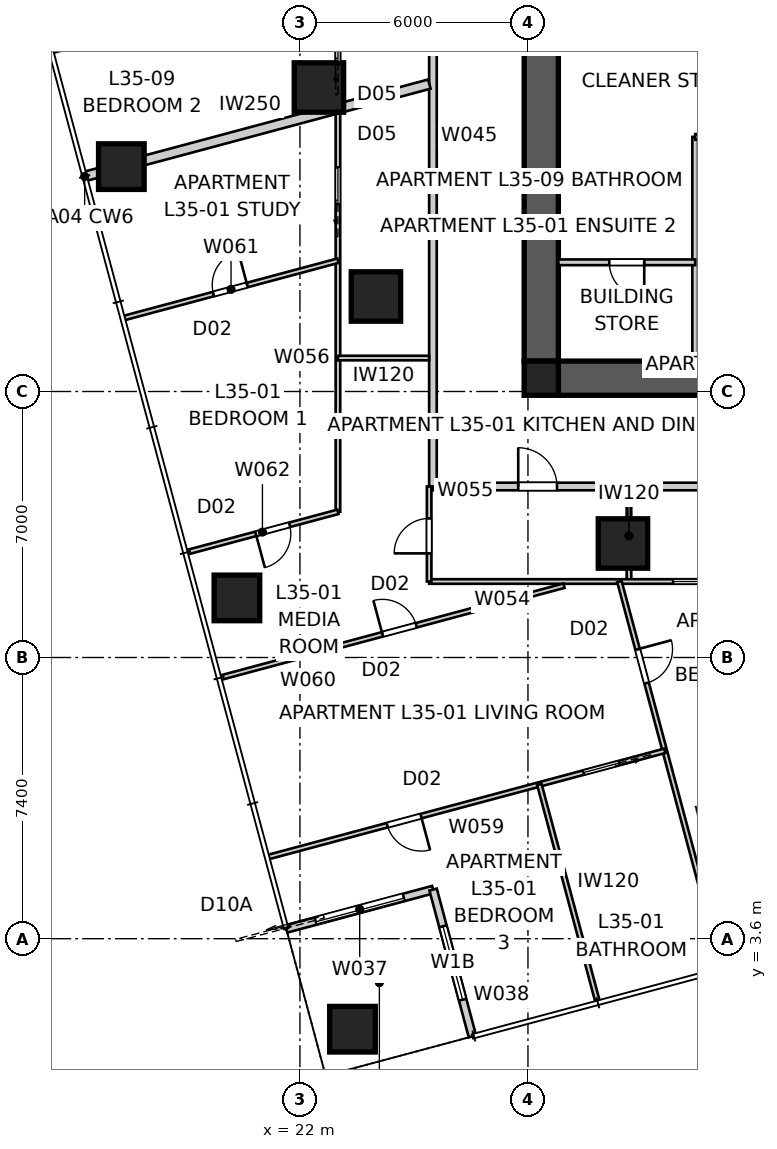
"""IFC4 building model, lengths in metres.
Left out: names, types, materials, properties, quantities, classifications, styles, units other than length and angle.
Written with IfcOpenShell. Run it as: python <this file> out.ifc"""

import sys

from ifc_helpers import new_model, si_unit, direction, frame, frame_2d, origin, origin_2d, place, context, subcontext, project, spatial, polyline, rectangle, outline, extrude, element, fill, save


model = new_model("IFC4")
c1 = context("Model", 3, precision=1e-05, world=origin(), true_north=direction((0.0, 1.0)))
c2 = subcontext(c1, "Body", "Model", "MODEL_VIEW")
j1 = project(units=[si_unit("LENGTHUNIT", "METRE"), si_unit("PLANEANGLEUNIT", "RADIAN")], contexts=[c1])
p1 = place(None, origin())
s1 = spatial("IfcSite", under=j1, at=p1, CompositionType="ELEMENT")
p2 = place(p1, origin())
s2 = spatial("IfcBuilding", under=s1, at=p2, CompositionType="ELEMENT")
p3 = place(p2, frame((0.0, 0.0, 128.6)))
s3 = spatial("IfcBuildingStorey", under=s2, at=p3, CompositionType="ELEMENT", Elevation=128.6)
p4 = place(p3, frame((51.2, 18.35, 0.0), z_axis=(0.0, 0.0, 1.0), x_axis=(-1.0, 0.0, 0.0)))
e1 = element("IfcWall", 1, at=p4, inside=s3, PredefinedType="SHEAR", context=c2, shape_type="SweptSolid", body=[
    extrude(outline(polyline([(0.0, -0.45), (22.4, -0.45), (22.4, -0.025), (22.85, -0.025), (22.85, 0.025), (22.4, 0.025), (22.4, 0.45), (0.0, 0.45), (0.0, 0.025), (-0.45, 0.025), (-0.45, -0.025), (0.0, -0.025), (0.0, -0.45)])), origin(), (0.0, 0.0, 1.0), 3.4),
])
p5 = place(p3, frame((28.35, 41.2, 0.0), z_axis=(0.0, 0.0, 1.0), x_axis=(0.0, -1.0, 0.0)))
e2 = element("IfcWall", 2, at=p5, inside=s3, PredefinedType="SHEAR", context=c2, shape_type="SweptSolid", body=[
    extrude(outline(polyline([(0.0, -0.45), (22.4, -0.45), (22.4, -0.025), (22.85, -0.025), (22.85, 0.025), (22.4, 0.025), (22.4, 0.45), (0.0, 0.45), (0.0, 0.025), (-0.45, 0.025), (-0.45, -0.025), (0.0, -0.025), (0.0, -0.45)])), origin(), (0.0, 0.0, 1.0), 3.4),
])
p6 = place(p5, frame((11.14, 0.0, 0.0)))
e3 = element("IfcOpeningElement", 3, at=p6, cuts=e2, PredefinedType="OPENING", context=c2, shape_type="SweptSolid", body=[
    extrude(rectangle(XDim=1.02, YDim=2.4, at=frame_2d((0.51, 1.2))), frame((0.0, 0.46, 0.0), z_axis=(0.0, -1.0, 0.0), x_axis=(1.0, 0.0, 0.0)), (0.0, 0.0, 1.0), 0.92),
])
p7 = place(p3, frame((28.35, 18.35, 0.0), z_axis=(0.0, 0.0, 1.0), x_axis=(1.0, 0.0, 0.0)))
e4 = element("IfcColumn", 4, at=p7, inside=s3, PredefinedType="COLUMN", context=c2, shape_type="SweptSolid", body=[
    extrude(rectangle(XDim=0.9, YDim=0.9, at=origin_2d()), origin(), (0.0, 0.0, 1.0), 3.4),
])
for number, where, z_axis, x_axis in (
    (5, (23.383, 1.219, 0.0), (0.0, 0.0, 1.0), (1.0, 0.0, 0.0)),
    (6, (17.301, 23.918, 0.0), (0.0, 0.0, 1.0), (1.0, 0.0, 0.0)),
    (7, (20.342, 12.568, 0.0), (0.0, 0.0, 1.0), (1.0, 0.0, 0.0)),
):
    element("IfcColumn", number, at=place(p3, frame(where, z_axis=z_axis, x_axis=x_axis)), inside=s3, PredefinedType="COLUMN", context=c2, shape_type="SweptSolid", body=[
        extrude(rectangle(XDim=1.2, YDim=1.2, at=origin_2d()), origin(), (0.0, 0.0, 1.0), 3.4),
    ])
for number, where, z_axis, x_axis in (
    (8, (22.5, 26.0, 0.0), (0.0, 0.0, 1.0), (1.0, 0.0, 0.0)),
    (9, (24.0, 20.5, 0.0), (0.0, 0.0, 1.0), (1.0, 0.0, 0.0)),
    (10, (30.5, 14.0, 0.0), (0.0, 0.0, 1.0), (1.0, 0.0, 0.0)),
):
    element("IfcColumn", number, at=place(p3, frame(where, z_axis=z_axis, x_axis=x_axis)), inside=s3, PredefinedType="COLUMN", context=c2, shape_type="SweptSolid", body=[
        extrude(rectangle(XDim=1.3, YDim=1.3, at=origin_2d()), origin(), (0.0, 0.0, 1.0), 3.4),
    ])
p8 = place(p3, frame((21.641, 3.857, 0.0), z_axis=(0.0, 0.0, 1.0), x_axis=(0.965919172068, 0.258843877716, 0.0)))
e11 = element("IfcWall", 11, at=p8, inside=s3, PredefinedType="SOLIDWALL", context=c2, shape_type="SweptSolid", body=[
    extrude(rectangle(XDim=4.0, YDim=0.2, at=frame_2d((2.0, 0.0))), origin(), (0.0, 0.0, 1.0), 3.25),
])
p9 = place(p8, frame((0.8, 0.0, 0.0)))
e12 = element("IfcOpeningElement", 12, at=p9, cuts=e11, PredefinedType="OPENING", context=c2, shape_type="SweptSolid", body=[
    extrude(rectangle(XDim=2.4, YDim=2.1, at=frame_2d((1.2, 1.05))), frame((0.0, 0.11, 0.0), z_axis=(0.0, -1.0, 0.0), x_axis=(1.0, 0.0, 0.0)), (0.0, 0.0, 1.0), 0.22),
])
p10 = place(p3, frame((25.504, 4.893, 0.0), z_axis=(0.0, 0.0, 1.0), x_axis=(0.258786931944, -0.965934430412, 0.0)))
e13 = element("IfcWall", 13, at=p10, inside=s3, PredefinedType="SOLIDWALL", context=c2, shape_type="SweptSolid", body=[
    extrude(rectangle(XDim=4.0, YDim=0.2, at=frame_2d((2.0, 0.0))), origin(), (0.0, 0.0, 1.0), 3.25),
])
p11 = place(p10, frame((1.0, 0.0, 0.45)))
e14 = element("IfcOpeningElement", 14, at=p11, cuts=e13, PredefinedType="OPENING", context=c2, shape_type="SweptSolid", body=[
    extrude(rectangle(XDim=2.0, YDim=1.8, at=frame_2d((1.0, 0.9))), frame((0.0, 0.11, 0.0), z_axis=(0.0, -1.0, 0.0), x_axis=(1.0, 0.0, 0.0)), (0.0, 0.0, 1.0), 0.22),
])
p12 = place(p3, frame((25.5, 15.5, 0.0), z_axis=(0.0, 0.0, 1.0), x_axis=(1.0, 0.0, 0.0)))
e15 = element("IfcWall", 15, at=p12, inside=s3, PredefinedType="PARTITIONING", context=c2, shape_type="SweptSolid", body=[
    extrude(rectangle(XDim=28.2, YDim=0.2, at=frame_2d((14.1, 0.0))), origin(), (0.0, 0.0, 1.0), 3.25),
])
p13 = place(p12, frame((2.244, 0.0, 0.0)))
e16 = element("IfcOpeningElement", 16, at=p13, cuts=e15, PredefinedType="OPENING", context=c2, shape_type="SweptSolid", body=[
    extrude(rectangle(XDim=1.02, YDim=2.1, at=frame_2d((0.51, 1.05))), frame((0.0, 0.11, 0.0), z_axis=(0.0, -1.0, 0.0), x_axis=(1.0, 0.0, 0.0)), (0.0, 0.0, 1.0), 0.22),
])
p14 = place(p12, frame((9.542, 0.0, 0.0)))
e17 = element("IfcOpeningElement", 17, at=p14, cuts=e15, PredefinedType="OPENING", context=c2, shape_type="SweptSolid", body=[
    extrude(rectangle(XDim=1.02, YDim=2.34, at=frame_2d((0.51, 1.17))), frame((0.0, 0.11, 0.0), z_axis=(0.0, -1.0, 0.0), x_axis=(1.0, 0.0, 0.0)), (0.0, 0.0, 1.0), 0.22),
])
p15 = place(p12, frame((21.994, 0.0, 0.0)))
e18 = element("IfcOpeningElement", 18, at=p15, cuts=e15, PredefinedType="OPENING", context=c2, shape_type="SweptSolid", body=[
    extrude(rectangle(XDim=1.02, YDim=2.34, at=frame_2d((0.51, 1.17))), frame((0.0, 0.11, 0.0), z_axis=(0.0, -1.0, 0.0), x_axis=(1.0, 0.0, 0.0)), (0.0, 0.0, 1.0), 0.22),
])
p16 = place(p3, frame((25.5, 43.7, 0.0), z_axis=(0.0, 0.0, 1.0), x_axis=(0.0, -1.0, 0.0)))
e19 = element("IfcWall", 19, at=p16, inside=s3, PredefinedType="PARTITIONING", context=c2, shape_type="SweptSolid", body=[
    extrude(rectangle(XDim=28.2, YDim=0.2, at=frame_2d((14.1, 0.0))), origin(), (0.0, 0.0, 1.0), 3.25),
])
p17 = place(p16, frame((8.742, 0.0, 0.0)))
e20 = element("IfcOpeningElement", 20, at=p17, cuts=e19, PredefinedType="OPENING", context=c2, shape_type="SweptSolid", body=[
    extrude(rectangle(XDim=1.02, YDim=2.34, at=frame_2d((0.51, 1.17))), frame((0.0, 0.11, 0.0), z_axis=(0.0, -1.0, 0.0), x_axis=(1.0, 0.0, 0.0)), (0.0, 0.0, 1.0), 0.22),
])
p18 = place(p16, frame((1.808, 0.0, 0.0)))
e21 = element("IfcOpeningElement", 21, at=p18, cuts=e19, PredefinedType="OPENING", context=c2, shape_type="SweptSolid", body=[
    extrude(rectangle(XDim=1.02, YDim=2.1, at=frame_2d((0.51, 1.05))), frame((0.0, 0.11, 0.0), z_axis=(0.0, -1.0, 0.0), x_axis=(1.0, 0.0, 0.0)), (0.0, 0.0, 1.0), 0.22),
])
p19 = place(p3, frame((16.335, 23.659, 0.0), z_axis=(0.0, 0.0, 1.0), x_axis=(0.965927049013, 0.258814481793, 0.0)))
e22 = element("IfcWall", 22, at=p19, inside=s3, PredefinedType="PARTITIONING", context=c2, shape_type="SweptSolid", body=[
    extrude(rectangle(XDim=9.392, YDim=0.25, at=frame_2d((4.696, 0.0))), origin(), (0.0, 0.0, 1.0), 3.25),
])
p20 = place(p3, frame((32.4, 18.8, 0.0), z_axis=(0.0, 0.0, 1.0), x_axis=(0.0, 1.0, 0.0)))
e23 = element("IfcWall", 23, at=p20, inside=s3, PredefinedType="SOLIDWALL", context=c2, shape_type="SweptSolid", body=[
    extrude(rectangle(XDim=5.9, YDim=0.15, at=frame_2d((2.95, 0.0))), origin(), (0.0, 0.0, 1.0), 3.25),
])
p21 = place(p3, frame((32.4, 24.7, 0.0), z_axis=(0.0, 0.0, 1.0), x_axis=(1.0, 0.0, 0.0)))
e24 = element("IfcWall", 24, at=p21, inside=s3, PredefinedType="SOLIDWALL", context=c2, shape_type="SweptSolid", body=[
    extrude(rectangle(XDim=1.85, YDim=0.15, at=frame_2d((0.925, 0.0))), origin(), (0.0, 0.0, 1.0), 3.25),
])
p22 = place(p3, frame((32.4, 21.4, 0.0), z_axis=(0.0, 0.0, 1.0), x_axis=(-1.0, 0.0, 0.0)))
e25 = element("IfcWall", 25, at=p22, inside=s3, PredefinedType="SOLIDWALL", context=c2, shape_type="SweptSolid", body=[
    extrude(rectangle(XDim=3.6, YDim=0.15, at=frame_2d((1.8, 0.0))), origin(), (0.0, 0.0, 1.0), 3.25),
])
p23 = place(p22, frame((1.34, 0.0, 0.0)))
e26 = element("IfcOpeningElement", 26, at=p23, cuts=e25, PredefinedType="OPENING", context=c2, shape_type="SweptSolid", body=[
    extrude(rectangle(XDim=0.92, YDim=2.1, at=frame_2d((0.46, 1.05))), frame((0.0, 0.085, 0.0), z_axis=(0.0, -1.0, 0.0), x_axis=(1.0, 0.0, 0.0)), (0.0, 0.0, 1.0), 0.17),
])
p24 = place(p3, frame((30.658, 15.4, 0.0), z_axis=(0.0, 0.0, 1.0), x_axis=(0.0, -1.0, 0.0)))
e27 = element("IfcWall", 27, at=p24, inside=s3, PredefinedType="PARTITIONING", context=c2, shape_type="SweptSolid", body=[
    extrude(rectangle(XDim=2.4, YDim=0.12, at=frame_2d((1.2, 0.0))), origin(), (0.0, 0.0, 1.0), 3.25),
])
p25 = place(p3, frame((41.07, 13.0, 0.0), z_axis=(0.0, 0.0, 1.0), x_axis=(-1.0, 0.0, 0.0)))
e28 = element("IfcWall", 28, at=p25, inside=s3, PredefinedType="PARTITIONING", context=c2, shape_type="SweptSolid", body=[
    extrude(rectangle(XDim=15.67, YDim=0.12, at=frame_2d((7.835, 0.0))), origin(), (0.0, 0.0, 1.0), 2.55),
])
p26 = place(p25, frame((5.772, 0.0, 0.0)))
e29 = element("IfcOpeningElement", 29, at=p26, cuts=e28, PredefinedType="OPENING", context=c2, shape_type="SweptSolid", body=[
    extrude(rectangle(XDim=0.92, YDim=2.34, at=frame_2d((0.46, 1.17))), frame((0.0, 0.07, 0.0), z_axis=(0.0, -1.0, 0.0), x_axis=(1.0, 0.0, 0.0)), (0.0, 0.0, 1.0), 0.14),
])
p27 = place(p25, frame((8.289, 0.0, 0.0)))
e30 = element("IfcOpeningElement", 30, at=p27, cuts=e28, PredefinedType="OPENING", context=c2, shape_type="SweptSolid", body=[
    extrude(rectangle(XDim=0.96, YDim=2.1, at=frame_2d((0.48, 1.05))), frame((0.0, 0.07, 0.0), z_axis=(0.0, -1.0, 0.0), x_axis=(1.0, 0.0, 0.0)), (0.0, 0.0, 1.0), 0.14),
])
p28 = place(p3, frame((25.4, 13.0, 0.0), z_axis=(0.0, 0.0, 1.0), x_axis=(0.0, 1.0, 0.0)))
e31 = element("IfcWall", 31, at=p28, inside=s3, PredefinedType="PARTITIONING", context=c2, shape_type="SweptSolid", body=[
    extrude(rectangle(XDim=2.5, YDim=0.12, at=frame_2d((1.25, 0.0))), origin(), (0.0, 0.0, 1.0), 3.25),
])
p29 = place(p28, frame((0.74, 0.0, 0.0)))
e32 = element("IfcOpeningElement", 32, at=p29, cuts=e31, PredefinedType="OPENING", context=c2, shape_type="SweptSolid", body=[
    extrude(rectangle(XDim=0.92, YDim=2.34, at=frame_2d((0.46, 1.17))), frame((0.0, 0.07, 0.0), z_axis=(0.0, -1.0, 0.0), x_axis=(1.0, 0.0, 0.0)), (0.0, 0.0, 1.0), 0.14),
])
p30 = place(p3, frame((23.0, 14.833, 0.0), z_axis=(0.0, 0.0, 1.0), x_axis=(0.0, 1.0, 0.0)))
e33 = element("IfcWall", 33, at=p30, inside=s3, PredefinedType="PARTITIONING", context=c2, shape_type="SweptSolid", body=[
    extrude(rectangle(XDim=14.034, YDim=0.12, at=frame_2d((7.017, 0.0))), origin(), (0.0, 0.0, 1.0), 2.55),
])
p31 = place(p30, frame((11.843, 0.0, 0.0)))
e34 = element("IfcOpeningElement", 34, at=p31, cuts=e33, PredefinedType="OPENING", context=c2, shape_type="SweptSolid", body=[
    extrude(rectangle(XDim=0.96, YDim=2.1, at=frame_2d((0.48, 1.05))), frame((0.0, 0.07, 0.0), z_axis=(0.0, -1.0, 0.0), x_axis=(1.0, 0.0, 0.0)), (0.0, 0.0, 1.0), 0.14),
])
p32 = place(p30, frame((8.104, 0.0, 0.0)))
e35 = element("IfcOpeningElement", 35, at=p32, cuts=e33, PredefinedType="OPENING", context=c2, shape_type="SweptSolid", body=[
    extrude(rectangle(XDim=0.96, YDim=2.1, at=frame_2d((0.48, 1.05))), frame((0.0, 0.07, 0.0), z_axis=(0.0, -1.0, 0.0), x_axis=(1.0, 0.0, 0.0)), (0.0, 0.0, 1.0), 0.14),
])
p33 = place(p3, frame((25.4, 18.88, 0.0), z_axis=(0.0, 0.0, 1.0), x_axis=(-1.0, 0.0, 0.0)))
e36 = element("IfcWall", 36, at=p33, inside=s3, PredefinedType="PARTITIONING", context=c2, shape_type="SweptSolid", body=[
    extrude(rectangle(XDim=2.4, YDim=0.12, at=frame_2d((1.2, 0.0))), origin(), (0.0, 0.0, 1.0), 2.722),
])
p34 = place(p3, frame((30.406, 13.0, 0.0), z_axis=(0.0, 0.0, 1.0), x_axis=(0.258819200315, -0.9659257847, 0.0)))
e37 = element("IfcWall", 37, at=p34, inside=s3, PredefinedType="PARTITIONING", context=c2, shape_type="SweptSolid", body=[
    extrude(rectangle(XDim=10.522, YDim=0.12, at=frame_2d((5.261, 0.0))), origin(), (0.0, 0.0, 1.0), 2.722),
])
p35 = place(p34, frame((1.846, 0.0, 0.0)))
e38 = element("IfcOpeningElement", 38, at=p35, cuts=e37, PredefinedType="OPENING", context=c2, shape_type="SweptSolid", body=[
    extrude(rectangle(XDim=0.92, YDim=2.34, at=frame_2d((0.46, 1.17))), frame((0.0, 0.07, 0.0), z_axis=(0.0, -1.0, 0.0), x_axis=(1.0, 0.0, 0.0)), (0.0, 0.0, 1.0), 0.14),
])
p36 = place(p3, frame((31.6, 8.544, 0.0), z_axis=(0.0, 0.0, 1.0), x_axis=(-0.965927151587, -0.258814098973, 0.0)))
e39 = element("IfcWall", 39, at=p36, inside=s3, PredefinedType="PARTITIONING", context=c2, shape_type="SweptSolid", body=[
    extrude(rectangle(XDim=10.793, YDim=0.12, at=frame_2d((5.396, 0.0))), origin(), (0.0, 0.0, 1.0), 3.25),
])
p37 = place(p36, frame((6.64, 0.0, 0.0)))
e40 = element("IfcOpeningElement", 40, at=p37, cuts=e39, PredefinedType="OPENING", context=c2, shape_type="SweptSolid", body=[
    extrude(rectangle(XDim=0.92, YDim=2.34, at=frame_2d((0.46, 1.17))), frame((0.0, 0.07, 0.0), z_axis=(0.0, -1.0, 0.0), x_axis=(1.0, 0.0, 0.0)), (0.0, 0.0, 1.0), 0.14),
])
p38 = place(p36, frame((1.253, 0.0, 0.0)))
e41 = element("IfcOpeningElement", 41, at=p38, cuts=e39, PredefinedType="OPENING", context=c2, shape_type="SweptSolid", body=[
    extrude(rectangle(XDim=0.96, YDim=2.1, at=frame_2d((0.48, 1.05))), frame((0.0, 0.07, 0.0), z_axis=(0.0, -1.0, 0.0), x_axis=(1.0, 0.0, 0.0)), (0.0, 0.0, 1.0), 0.14),
])
p39 = place(p3, frame((19.911, 10.468, 0.0), z_axis=(0.0, 0.0, 1.0), x_axis=(0.965927203676, 0.25881390457, 0.0)))
e42 = element("IfcWall", 42, at=p39, inside=s3, PredefinedType="PARTITIONING", context=c2, shape_type="SweptSolid", body=[
    extrude(rectangle(XDim=9.357, YDim=0.12, at=frame_2d((4.678, 0.0))), origin(), (0.0, 0.0, 1.0), 2.638),
])
p40 = place(p39, frame((4.411, 0.0, 0.0)))
e43 = element("IfcOpeningElement", 43, at=p40, cuts=e42, PredefinedType="OPENING", context=c2, shape_type="SweptSolid", body=[
    extrude(rectangle(XDim=0.92, YDim=2.34, at=frame_2d((0.46, 1.17))), frame((0.0, 0.07, 0.0), z_axis=(0.0, -1.0, 0.0), x_axis=(1.0, 0.0, 0.0)), (0.0, 0.0, 1.0), 0.14),
])
p41 = place(p3, frame((17.374, 19.934, 0.0), z_axis=(0.0, 0.0, 1.0), x_axis=(0.965929528031, 0.258805229617, 0.0)))
e44 = element("IfcWall", 44, at=p41, inside=s3, PredefinedType="PARTITIONING", context=c2, shape_type="SweptSolid", body=[
    extrude(rectangle(XDim=5.824, YDim=0.12, at=frame_2d((2.912, 0.0))), origin(), (0.0, 0.0, 1.0), 3.25),
])
p42 = place(p41, frame((2.432, 0.0, 0.0)))
e45 = element("IfcOpeningElement", 45, at=p42, cuts=e44, PredefinedType="OPENING", context=c2, shape_type="SweptSolid", body=[
    extrude(rectangle(XDim=0.92, YDim=2.34, at=frame_2d((0.46, 1.17))), frame((0.0, 0.07, 0.0), z_axis=(0.0, -1.0, 0.0), x_axis=(1.0, 0.0, 0.0)), (0.0, 0.0, 1.0), 0.14),
])
p43 = place(p3, frame((23.0, 14.833, 0.0), z_axis=(0.0, 0.0, 1.0), x_axis=(-0.965927919062, -0.258811234642, 0.0)))
e46 = element("IfcWall", 46, at=p43, inside=s3, PredefinedType="PARTITIONING", context=c2, shape_type="SweptSolid", body=[
    extrude(rectangle(XDim=4.114, YDim=0.12, at=frame_2d((2.057, 0.0))), origin(), (0.0, 0.0, 1.0), 3.25),
])
p44 = place(p43, frame((1.317, 0.0, 0.0)))
e47 = element("IfcOpeningElement", 47, at=p44, cuts=e46, PredefinedType="OPENING", context=c2, shape_type="SweptSolid", body=[
    extrude(rectangle(XDim=0.92, YDim=2.34, at=frame_2d((0.46, 1.17))), frame((0.0, 0.07, 0.0), z_axis=(0.0, -1.0, 0.0), x_axis=(1.0, 0.0, 0.0)), (0.0, 0.0, 1.0), 0.14),
])
p45 = place(p3, frame((28.3, 7.66, 0.0), z_axis=(0.0, 0.0, 1.0), x_axis=(0.25882212607, -0.965925000741, 0.0)))
e48 = element("IfcWall", 48, at=p45, inside=s3, PredefinedType="PARTITIONING", context=c2, shape_type="SweptSolid", body=[
    extrude(rectangle(XDim=5.91, YDim=0.12, at=frame_2d((2.955, 0.0))), origin(), (0.0, 0.0, 1.0), 3.25),
])
p46 = place(p3, frame((23.0, 28.982, 0.0), z_axis=(0.0, 0.0, 1.0), x_axis=(-0.965927309482, -0.258813509689, 0.0)))
e49 = element("IfcWall", 49, at=p46, inside=s3, PredefinedType="PARTITIONING", context=c2, shape_type="SweptSolid", body=[
    extrude(rectangle(XDim=7.776, YDim=0.12, at=frame_2d((3.888, 0.0))), origin(), (0.0, 0.0, 1.0), 3.25),
])
p47 = place(p9, origin())
e50 = element("IfcDoor", 50, at=p47, inside=s3, OperationType="SLIDING_TO_LEFT", PredefinedType="DOOR", context=c2, shape_type="SweptSolid", body=[
    extrude(rectangle(XDim=2.4, YDim=2.1, at=frame_2d((1.2, 1.05))), frame((0.0, 0.025, 0.0), z_axis=(0.0, -1.0, 0.0), x_axis=(1.0, 0.0, 0.0)), (0.0, 0.0, 1.0), 0.05),
])
fill(e12, e50)
p48 = place(p11, origin())
e51 = element("IfcWindow", 51, at=p48, inside=s3, PartitioningType="SINGLE_PANEL", PredefinedType="WINDOW", context=c2, shape_type="SweptSolid", body=[
    extrude(rectangle(XDim=2.0, YDim=1.8, at=frame_2d((1.0, 0.9))), frame((0.0, 0.03, 0.0), z_axis=(0.0, -1.0, 0.0), x_axis=(1.0, 0.0, 0.0)), (0.0, 0.0, 1.0), 0.06),
])
fill(e14, e51)
p49 = place(p13, origin())
e52 = element("IfcDoor", 52, at=p49, inside=s3, OperationType="SINGLE_SWING_LEFT", PredefinedType="DOOR", context=c2, shape_type="SweptSolid", body=[
    extrude(rectangle(XDim=1.02, YDim=2.1, at=frame_2d((0.51, 1.05))), frame((0.0, 0.025, 0.0), z_axis=(0.0, -1.0, 0.0), x_axis=(1.0, 0.0, 0.0)), (0.0, 0.0, 1.0), 0.05),
])
fill(e16, e52)
p50 = place(p23, origin())
e53 = element("IfcDoor", 53, at=p50, inside=s3, OperationType="SINGLE_SWING_LEFT", PredefinedType="DOOR", context=c2, shape_type="SweptSolid", body=[
    extrude(rectangle(XDim=0.92, YDim=2.1, at=frame_2d((0.46, 1.05))), frame((0.0, 0.025, 0.0), z_axis=(0.0, -1.0, 0.0), x_axis=(1.0, 0.0, 0.0)), (0.0, 0.0, 1.0), 0.05),
])
fill(e26, e53)
p51 = place(p29, origin())
e54 = element("IfcDoor", 54, at=p51, inside=s3, OperationType="SINGLE_SWING_LEFT", PredefinedType="DOOR", context=c2, shape_type="SweptSolid", body=[
    extrude(rectangle(XDim=0.92, YDim=2.34, at=frame_2d((0.46, 1.17))), frame((0.0, 0.025, 0.0), z_axis=(0.0, -1.0, 0.0), x_axis=(1.0, 0.0, 0.0)), (0.0, 0.0, 1.0), 0.05),
])
fill(e32, e54)
p52 = place(p40, origin())
e55 = element("IfcDoor", 55, at=p52, inside=s3, OperationType="SINGLE_SWING_LEFT", PredefinedType="DOOR", context=c2, shape_type="SweptSolid", body=[
    extrude(rectangle(XDim=0.92, YDim=2.34, at=frame_2d((0.46, 1.17))), frame((0.0, 0.025, 0.0), z_axis=(0.0, -1.0, 0.0), x_axis=(1.0, 0.0, 0.0)), (0.0, 0.0, 1.0), 0.05),
])
fill(e43, e55)
p53 = place(p44, origin())
e56 = element("IfcDoor", 56, at=p53, inside=s3, OperationType="SINGLE_SWING_RIGHT", PredefinedType="DOOR", context=c2, shape_type="SweptSolid", body=[
    extrude(rectangle(XDim=0.92, YDim=2.34, at=frame_2d((0.46, 1.17))), frame((0.0, 0.025, 0.0), z_axis=(0.0, -1.0, 0.0), x_axis=(1.0, 0.0, 0.0)), (0.0, 0.0, 1.0), 0.05),
])
fill(e47, e56)
p54 = place(p37, origin())
e57 = element("IfcDoor", 57, at=p54, inside=s3, OperationType="SINGLE_SWING_LEFT", PredefinedType="DOOR", context=c2, shape_type="SweptSolid", body=[
    extrude(rectangle(XDim=0.92, YDim=2.34, at=frame_2d((0.46, 1.17))), frame((0.0, 0.025, 0.0), z_axis=(0.0, -1.0, 0.0), x_axis=(1.0, 0.0, 0.0)), (0.0, 0.0, 1.0), 0.05),
])
fill(e40, e57)
p55 = place(p35, origin())
e58 = element("IfcDoor", 58, at=p55, inside=s3, OperationType="SINGLE_SWING_LEFT", PredefinedType="DOOR", context=c2, shape_type="SweptSolid", body=[
    extrude(rectangle(XDim=0.92, YDim=2.34, at=frame_2d((0.46, 1.17))), frame((0.0, 0.025, 0.0), z_axis=(0.0, -1.0, 0.0), x_axis=(1.0, 0.0, 0.0)), (0.0, 0.0, 1.0), 0.05),
])
fill(e38, e58)
p56 = place(p38, origin())
e59 = element("IfcDoor", 59, at=p56, inside=s3, OperationType="SLIDING_TO_LEFT", PredefinedType="DOOR", context=c2, shape_type="SweptSolid", body=[
    extrude(rectangle(XDim=0.96, YDim=2.1, at=frame_2d((0.48, 1.05))), frame((0.0, 0.025, 0.0), z_axis=(0.0, -1.0, 0.0), x_axis=(1.0, 0.0, 0.0)), (0.0, 0.0, 1.0), 0.05),
])
fill(e41, e59)
p57 = place(p31, origin())
e60 = element("IfcDoor", 60, at=p57, inside=s3, OperationType="SLIDING_TO_LEFT", PredefinedType="DOOR", context=c2, shape_type="SweptSolid", body=[
    extrude(rectangle(XDim=0.96, YDim=2.1, at=frame_2d((0.48, 1.05))), frame((0.0, 0.025, 0.0), z_axis=(0.0, -1.0, 0.0), x_axis=(1.0, 0.0, 0.0)), (0.0, 0.0, 1.0), 0.05),
])
fill(e34, e60)
p58 = place(p42, origin())
e61 = element("IfcDoor", 61, at=p58, inside=s3, OperationType="SINGLE_SWING_RIGHT", PredefinedType="DOOR", context=c2, shape_type="SweptSolid", body=[
    extrude(rectangle(XDim=0.92, YDim=2.34, at=frame_2d((0.46, 1.17))), frame((0.0, 0.025, 0.0), z_axis=(0.0, -1.0, 0.0), x_axis=(1.0, 0.0, 0.0)), (0.0, 0.0, 1.0), 0.05),
])
fill(e45, e61)
p59 = place(p32, origin())
e62 = element("IfcDoor", 62, at=p59, inside=s3, OperationType="SLIDING_TO_LEFT", PredefinedType="DOOR", context=c2, shape_type="SweptSolid", body=[
    extrude(rectangle(XDim=0.96, YDim=2.1, at=frame_2d((0.48, 1.05))), frame((0.0, 0.025, 0.0), z_axis=(0.0, -1.0, 0.0), x_axis=(1.0, 0.0, 0.0)), (0.0, 0.0, 1.0), 0.05),
])
fill(e35, e62)
p60 = place(p27, origin())
e63 = element("IfcDoor", 63, at=p60, inside=s3, OperationType="SLIDING_TO_LEFT", PredefinedType="DOOR", context=c2, shape_type="SweptSolid", body=[
    extrude(rectangle(XDim=0.96, YDim=2.1, at=frame_2d((0.48, 1.05))), frame((0.0, 0.025, 0.0), z_axis=(0.0, -1.0, 0.0), x_axis=(1.0, 0.0, 0.0)), (0.0, 0.0, 1.0), 0.05),
])
fill(e30, e63)
save(model, sys.argv[1])
